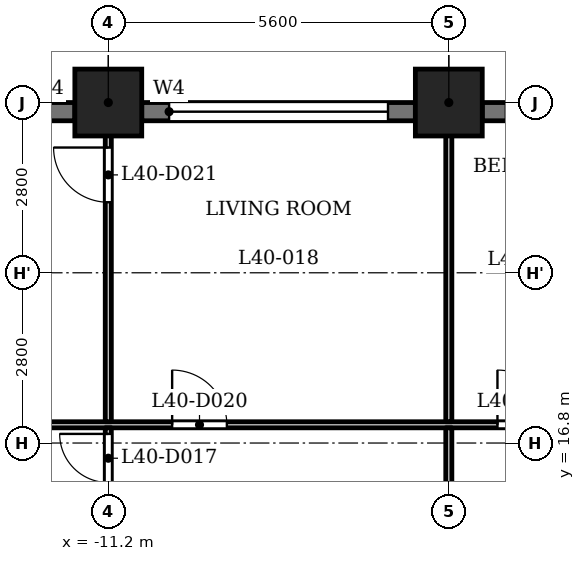
"""IFC4 building model, lengths in metres.
Left out: names, types, materials, properties, quantities, classifications, styles, units other than length and angle.
Written with IfcOpenShell. Run it as: python <this file> out.ifc"""

import sys

from ifc_helpers import new_model, si_unit, direction, frame, frame_2d, origin, origin_2d, place, context, subcontext, project, spatial, rectangle, extrude, element, fill, save


model = new_model("IFC4")
c1 = context("Model", 3, precision=1e-05, world=origin(), true_north=direction((0.0, 1.0)))
c2 = subcontext(c1, "Body", "Model", "MODEL_VIEW")
j1 = project(units=[si_unit("LENGTHUNIT", "METRE"), si_unit("PLANEANGLEUNIT", "RADIAN")], contexts=[c1])
p1 = place(None, origin())
s1 = spatial("IfcSite", under=j1, at=p1, CompositionType="ELEMENT")
p2 = place(p1, origin())
s2 = spatial("IfcBuilding", under=s1, at=p2, CompositionType="ELEMENT")
p3 = place(p2, frame((0.0, 0.0, 157.1)))
s3 = spatial("IfcBuildingStorey", under=s2, at=p3, CompositionType="ELEMENT", Elevation=157.1)
for number, where, z_axis, x_axis in (
    (1, (-5.6, 22.4, 0.0), (0.0, 0.0, 1.0), (1.0, 0.0, 0.0)),
    (2, (-11.2, 22.4, 0.0), (0.0, 0.0, 1.0), (1.0, 0.0, 0.0)),
):
    element("IfcColumn", number, at=place(p3, frame(where, z_axis=z_axis, x_axis=x_axis)), inside=s3, PredefinedType="COLUMN", context=c2, shape_type="SweptSolid", body=[
        extrude(rectangle(XDim=1.1, YDim=1.1, at=origin_2d()), origin(), (0.0, 0.0, 1.0), 3.5),
    ])
p4 = place(p3, frame((-0.55, 22.25, 0.0), z_axis=(0.0, 0.0, 1.0), x_axis=(-1.0, 0.0, 0.0)))
e3 = element("IfcWall", 3, at=p4, inside=s3, PredefinedType="SOLIDWALL", context=c2, shape_type="SweptSolid", body=[
    extrude(rectangle(XDim=4.5, YDim=0.3, at=frame_2d((2.25, 0.0))), origin(), (0.0, 0.0, 1.0), 2.45),
])
p5 = place(p4, frame((0.288, 0.0, 0.9)))
e4 = element("IfcOpeningElement", 4, at=p5, cuts=e3, PredefinedType="OPENING", context=c2, shape_type="SweptSolid", body=[
    extrude(rectangle(XDim=1.8, YDim=1.25, at=frame_2d((0.9, 0.625))), frame((0.0, 0.16, 0.0), z_axis=(0.0, -1.0, 0.0), x_axis=(1.0, 0.0, 0.0)), (0.0, 0.0, 1.0), 0.32),
])
p6 = place(p4, frame((2.913, 0.0, 0.6)))
e5 = element("IfcOpeningElement", 5, at=p6, cuts=e3, PredefinedType="OPENING", context=c2, shape_type="SweptSolid", body=[
    extrude(rectangle(XDim=1.2, YDim=1.55, at=frame_2d((0.6, 0.775))), frame((0.0, 0.16, 0.0), z_axis=(0.0, -1.0, 0.0), x_axis=(1.0, 0.0, 0.0)), (0.0, 0.0, 1.0), 0.32),
])
p7 = place(p3, frame((-6.15, 22.25, 0.0), z_axis=(0.0, 0.0, 1.0), x_axis=(-1.0, 0.0, 0.0)))
e6 = element("IfcWall", 6, at=p7, inside=s3, PredefinedType="SOLIDWALL", context=c2, shape_type="SweptSolid", body=[
    extrude(rectangle(XDim=4.5, YDim=0.3, at=frame_2d((2.25, 0.0))), origin(), (0.0, 0.0, 1.0), 2.45),
])
p8 = place(p7, frame((0.45, 0.0, 1.2)))
e7 = element("IfcOpeningElement", 7, at=p8, cuts=e6, PredefinedType="OPENING", context=c2, shape_type="SweptSolid", body=[
    extrude(rectangle(XDim=3.6, YDim=0.95, at=frame_2d((1.8, 0.475))), frame((0.0, 0.16, 0.0), z_axis=(0.0, -1.0, 0.0), x_axis=(1.0, 0.0, 0.0)), (0.0, 0.0, 1.0), 0.32),
])
p9 = place(p3, frame((-11.75, 22.25, 0.0), z_axis=(0.0, 0.0, 1.0), x_axis=(-1.0, 0.0, 0.0)))
e8 = element("IfcWall", 8, at=p9, inside=s3, PredefinedType="SOLIDWALL", context=c2, shape_type="SweptSolid", body=[
    extrude(rectangle(XDim=4.5, YDim=0.3, at=frame_2d((2.25, 0.0))), origin(), (0.0, 0.0, 1.0), 2.45),
])
p10 = place(p9, frame((0.45, 0.0, 1.2)))
e9 = element("IfcOpeningElement", 9, at=p10, cuts=e8, PredefinedType="OPENING", context=c2, shape_type="SweptSolid", body=[
    extrude(rectangle(XDim=3.6, YDim=0.95, at=frame_2d((1.8, 0.475))), frame((0.0, 0.16, 0.0), z_axis=(0.0, -1.0, 0.0), x_axis=(1.0, 0.0, 0.0)), (0.0, 0.0, 1.0), 0.32),
])
p11 = place(p3, frame((-16.725, 17.1, 0.0), z_axis=(0.0, 0.0, 1.0), x_axis=(1.0, 0.0, 0.0)))
e10 = element("IfcWall", 10, at=p11, inside=s3, PredefinedType="PARTITIONING", context=c2, shape_type="SweptSolid", body=[
    extrude(rectangle(XDim=33.45, YDim=0.1, at=frame_2d((16.725, 0.0))), origin(), (0.0, 0.0, 1.0), 3.2),
])
p12 = place(p11, frame((11.925, 0.0, 0.0)))
e11 = element("IfcOpeningElement", 11, at=p12, cuts=e10, PredefinedType="OPENING", context=c2, shape_type="SweptSolid", body=[
    extrude(rectangle(XDim=0.9, YDim=2.1, at=frame_2d((0.45, 1.05))), frame((0.0, 0.06, 0.0), z_axis=(0.0, -1.0, 0.0), x_axis=(1.0, 0.0, 0.0)), (0.0, 0.0, 1.0), 0.12),
])
p13 = place(p11, frame((15.175, 0.0, 0.0)))
e12 = element("IfcOpeningElement", 12, at=p13, cuts=e10, PredefinedType="OPENING", context=c2, shape_type="SweptSolid", body=[
    extrude(rectangle(XDim=0.9, YDim=2.1, at=frame_2d((0.45, 1.05))), frame((0.0, 0.06, 0.0), z_axis=(0.0, -1.0, 0.0), x_axis=(1.0, 0.0, 0.0)), (0.0, 0.0, 1.0), 0.12),
])
p14 = place(p11, frame((6.575, 0.0, 0.0)))
e13 = element("IfcOpeningElement", 13, at=p14, cuts=e10, PredefinedType="OPENING", context=c2, shape_type="SweptSolid", body=[
    extrude(rectangle(XDim=0.9, YDim=2.1, at=frame_2d((0.45, 1.05))), frame((0.0, 0.06, 0.0), z_axis=(0.0, -1.0, 0.0), x_axis=(1.0, 0.0, 0.0)), (0.0, 0.0, 1.0), 0.12),
])
p15 = place(p11, frame((17.375, 0.0, 0.0)))
e14 = element("IfcOpeningElement", 14, at=p15, cuts=e10, PredefinedType="OPENING", context=c2, shape_type="SweptSolid", body=[
    extrude(rectangle(XDim=0.8, YDim=2.1, at=frame_2d((0.4, 1.05))), frame((0.0, 0.06, 0.0), z_axis=(0.0, -1.0, 0.0), x_axis=(1.0, 0.0, 0.0)), (0.0, 0.0, 1.0), 0.12),
])
p16 = place(p11, frame((20.025, 0.0, 0.0)))
e15 = element("IfcOpeningElement", 15, at=p16, cuts=e10, PredefinedType="OPENING", context=c2, shape_type="SweptSolid", body=[
    extrude(rectangle(XDim=0.9, YDim=2.1, at=frame_2d((0.45, 1.05))), frame((0.0, 0.06, 0.0), z_axis=(0.0, -1.0, 0.0), x_axis=(1.0, 0.0, 0.0)), (0.0, 0.0, 1.0), 0.12),
])
p17 = place(p11, frame((26.425, 0.0, 0.0)))
e16 = element("IfcOpeningElement", 16, at=p17, cuts=e10, PredefinedType="OPENING", context=c2, shape_type="SweptSolid", body=[
    extrude(rectangle(XDim=0.8, YDim=2.1, at=frame_2d((0.4, 1.05))), frame((0.0, 0.06, 0.0), z_axis=(0.0, -1.0, 0.0), x_axis=(1.0, 0.0, 0.0)), (0.0, 0.0, 1.0), 0.12),
])
p18 = place(p11, frame((23.025, 0.0, 0.0)))
e17 = element("IfcOpeningElement", 17, at=p18, cuts=e10, PredefinedType="OPENING", context=c2, shape_type="SweptSolid", body=[
    extrude(rectangle(XDim=0.9, YDim=2.1, at=frame_2d((0.45, 1.05))), frame((0.0, 0.06, 0.0), z_axis=(0.0, -1.0, 0.0), x_axis=(1.0, 0.0, 0.0)), (0.0, 0.0, 1.0), 0.12),
])
p19 = place(p11, frame((28.575, 0.0, 0.0)))
e18 = element("IfcOpeningElement", 18, at=p19, cuts=e10, PredefinedType="OPENING", context=c2, shape_type="SweptSolid", body=[
    extrude(rectangle(XDim=0.8, YDim=2.1, at=frame_2d((0.4, 1.05))), frame((0.0, 0.06, 0.0), z_axis=(0.0, -1.0, 0.0), x_axis=(1.0, 0.0, 0.0)), (0.0, 0.0, 1.0), 0.12),
])
p20 = place(p11, frame((30.725, 0.0, 0.0)))
e19 = element("IfcOpeningElement", 19, at=p20, cuts=e10, PredefinedType="OPENING", context=c2, shape_type="SweptSolid", body=[
    extrude(rectangle(XDim=0.9, YDim=2.1, at=frame_2d((0.45, 1.05))), frame((0.0, 0.06, 0.0), z_axis=(0.0, -1.0, 0.0), x_axis=(1.0, 0.0, 0.0)), (0.0, 0.0, 1.0), 0.12),
])
p21 = place(p3, frame((-11.2, 13.275, 0.0), z_axis=(0.0, 0.0, 1.0), x_axis=(0.0, 1.0, 0.0)))
e20 = element("IfcWall", 20, at=p21, inside=s3, PredefinedType="PARTITIONING", context=c2, shape_type="SweptSolid", body=[
    extrude(rectangle(XDim=3.775, YDim=0.1, at=frame_2d((1.888, 0.0))), origin(), (0.0, 0.0, 1.0), 3.2),
])
p22 = place(p21, frame((2.875, 0.0, 0.0)))
e21 = element("IfcOpeningElement", 21, at=p22, cuts=e20, PredefinedType="OPENING", context=c2, shape_type="SweptSolid", body=[
    extrude(rectangle(XDim=0.8, YDim=2.1, at=frame_2d((0.4, 1.05))), frame((0.0, 0.06, 0.0), z_axis=(0.0, -1.0, 0.0), x_axis=(1.0, 0.0, 0.0)), (0.0, 0.0, 1.0), 0.12),
])
p23 = place(p3, frame((-11.2, 17.15, 0.0), z_axis=(0.0, 0.0, 1.0), x_axis=(0.0, 1.0, 0.0)))
e22 = element("IfcWall", 22, at=p23, inside=s3, PredefinedType="PARTITIONING", context=c2, shape_type="SweptSolid", body=[
    extrude(rectangle(XDim=5.78, YDim=0.1, at=frame_2d((2.89, 0.0))), origin(), (0.0, 0.0, 1.0), 3.2),
])
p24 = place(p23, frame((3.61, 0.0, 0.0)))
e23 = element("IfcOpeningElement", 23, at=p24, cuts=e22, PredefinedType="OPENING", context=c2, shape_type="SweptSolid", body=[
    extrude(rectangle(XDim=0.9, YDim=2.1, at=frame_2d((0.45, 1.05))), frame((0.0, 0.06, 0.0), z_axis=(0.0, -1.0, 0.0), x_axis=(1.0, 0.0, 0.0)), (0.0, 0.0, 1.0), 0.12),
])
p25 = place(p3, frame((-5.6, 13.275, 0.0), z_axis=(0.0, 0.0, 1.0), x_axis=(0.0, 1.0, 0.0)))
e24 = element("IfcWall", 24, at=p25, inside=s3, PredefinedType="PARTITIONING", context=c2, shape_type="SweptSolid", body=[
    extrude(rectangle(XDim=3.775, YDim=0.1, at=frame_2d((1.888, 0.0))), origin(), (0.0, 0.0, 1.0), 3.2),
])
p26 = place(p25, frame((0.525, 0.0, 0.0)))
e25 = element("IfcOpeningElement", 25, at=p26, cuts=e24, PredefinedType="OPENING", context=c2, shape_type="SweptSolid", body=[
    extrude(rectangle(XDim=0.9, YDim=2.1, at=frame_2d((0.45, 1.05))), frame((0.0, 0.06, 0.0), z_axis=(0.0, -1.0, 0.0), x_axis=(1.0, 0.0, 0.0)), (0.0, 0.0, 1.0), 0.12),
])
p27 = place(p3, frame((-5.6, 17.15, 0.0), z_axis=(0.0, 0.0, 1.0), x_axis=(0.0, 1.0, 0.0)))
e26 = element("IfcWall", 26, at=p27, inside=s3, PredefinedType="PARTITIONING", context=c2, shape_type="SweptSolid", body=[
    extrude(rectangle(XDim=5.78, YDim=0.1, at=frame_2d((2.89, 0.0))), origin(), (0.0, 0.0, 1.0), 3.2),
])
p28 = place(p22, origin())
e27 = element("IfcDoor", 27, at=p28, inside=s3, OperationType="SINGLE_SWING_LEFT", PredefinedType="DOOR", context=c2, shape_type="SweptSolid", body=[
    extrude(rectangle(XDim=0.8, YDim=2.1, at=frame_2d((0.4, 1.05))), frame((0.0, 0.025, 0.0), z_axis=(0.0, -1.0, 0.0), x_axis=(1.0, 0.0, 0.0)), (0.0, 0.0, 1.0), 0.05),
])
fill(e21, e27)
p29 = place(p12, origin())
e28 = element("IfcDoor", 28, at=p29, inside=s3, OperationType="SINGLE_SWING_RIGHT", PredefinedType="DOOR", context=c2, shape_type="SweptSolid", body=[
    extrude(rectangle(XDim=0.9, YDim=2.1, at=frame_2d((0.45, 1.05))), frame((0.0, 0.025, 0.0), z_axis=(0.0, -1.0, 0.0), x_axis=(1.0, 0.0, 0.0)), (0.0, 0.0, 1.0), 0.05),
])
fill(e11, e28)
p30 = place(p14, origin())
e29 = element("IfcDoor", 29, at=p30, inside=s3, OperationType="SINGLE_SWING_RIGHT", PredefinedType="DOOR", context=c2, shape_type="SweptSolid", body=[
    extrude(rectangle(XDim=0.9, YDim=2.1, at=frame_2d((0.45, 1.05))), frame((0.0, 0.025, 0.0), z_axis=(0.0, -1.0, 0.0), x_axis=(1.0, 0.0, 0.0)), (0.0, 0.0, 1.0), 0.05),
])
fill(e13, e29)
p31 = place(p24, origin())
e30 = element("IfcDoor", 30, at=p31, inside=s3, OperationType="SINGLE_SWING_LEFT", PredefinedType="DOOR", context=c2, shape_type="SweptSolid", body=[
    extrude(rectangle(XDim=0.9, YDim=2.1, at=frame_2d((0.45, 1.05))), frame((0.0, 0.025, 0.0), z_axis=(0.0, -1.0, 0.0), x_axis=(1.0, 0.0, 0.0)), (0.0, 0.0, 1.0), 0.05),
])
fill(e23, e30)
p32 = place(p8, origin())
e31 = element("IfcWindow", 31, at=p32, inside=s3, PartitioningType="SINGLE_PANEL", PredefinedType="WINDOW", context=c2, shape_type="SweptSolid", body=[
    extrude(rectangle(XDim=3.6, YDim=0.95, at=frame_2d((1.8, 0.475))), frame((0.0, 0.03, 0.0), z_axis=(0.0, -1.0, 0.0), x_axis=(1.0, 0.0, 0.0)), (0.0, 0.0, 1.0), 0.06),
])
fill(e7, e31)
save(model, sys.argv[1])
